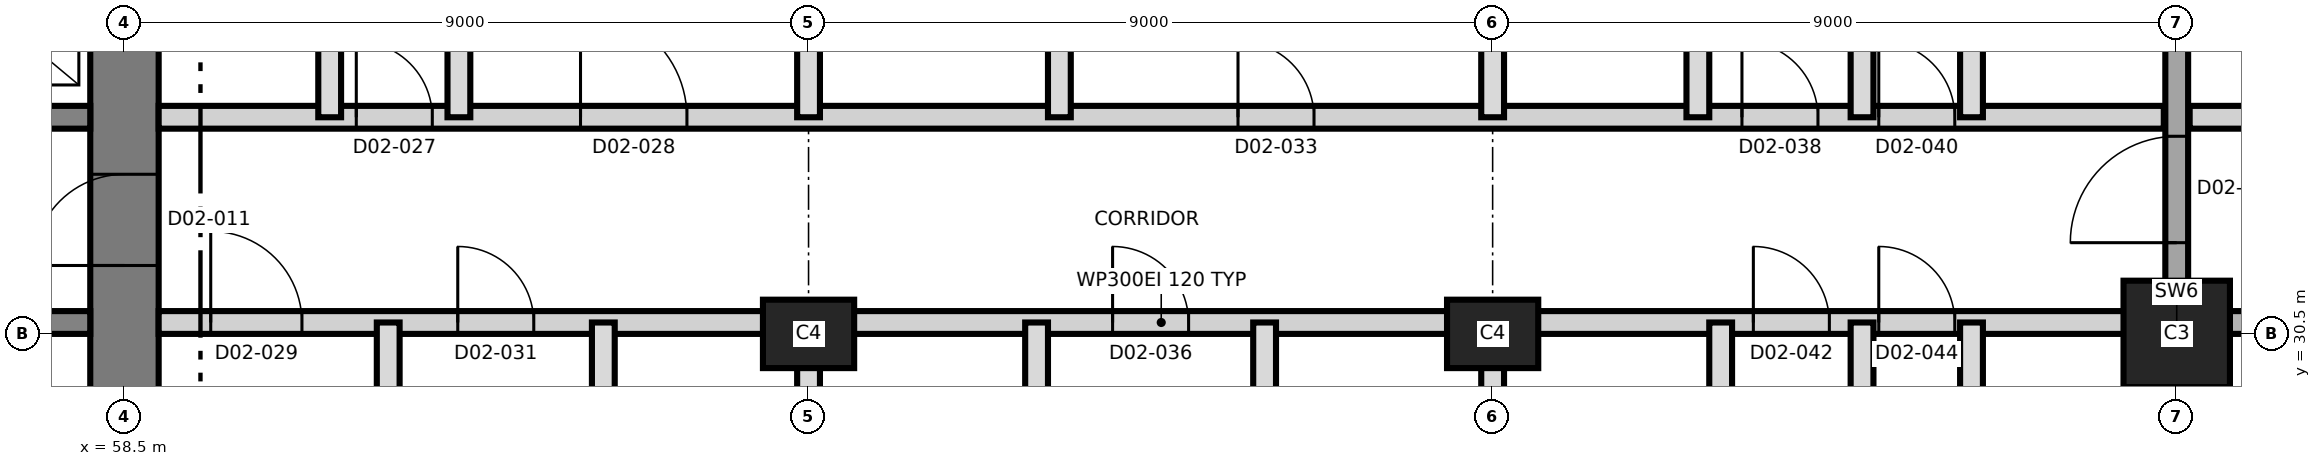
"""IFC4 building model, lengths in metres.
Left out: names, types, materials, properties, quantities, classifications, styles, units other than length and angle.
Written with IfcOpenShell. Run it as: python <this file> out.ifc"""

import sys

from ifc_helpers import new_model, si_unit, direction, frame, frame_2d, origin, origin_2d, place, context, subcontext, project, spatial, rectangle, extrude, element, fill, save


model = new_model("IFC4")
c1 = context("Model", 3, precision=1e-05, world=origin(), true_north=direction((0.0, 1.0)))
c2 = subcontext(c1, "Body", "Model", "MODEL_VIEW")
j1 = project(units=[si_unit("LENGTHUNIT", "METRE"), si_unit("PLANEANGLEUNIT", "RADIAN")], contexts=[c1])
p1 = place(None, origin())
s1 = spatial("IfcSite", under=j1, at=p1, CompositionType="ELEMENT")
p2 = place(p1, origin())
s2 = spatial("IfcBuilding", under=s1, at=p2, CompositionType="ELEMENT")
p3 = place(p2, frame((0.0, 0.0, 44.6)))
s3 = spatial("IfcBuildingStorey", under=s2, at=p3, CompositionType="ELEMENT", Elevation=44.6)
p4 = place(p3, frame((58.5, 21.05, 0.0), z_axis=(0.0, 0.0, 1.0), x_axis=(0.0, 1.0, 0.0)))
e1 = element("IfcWall", 1, at=p4, inside=s3, PredefinedType="SHEAR", context=c2, shape_type="SweptSolid", body=[
    extrude(rectangle(XDim=18.9, YDim=0.9, at=frame_2d((9.45, 0.0))), origin(), (0.0, 0.0, 1.0), 3.7),
])
p5 = place(p4, frame((10.35, 0.0, 0.0)))
e2 = element("IfcOpeningElement", 2, at=p5, cuts=e1, PredefinedType="OPENING", context=c2, shape_type="SweptSolid", body=[
    extrude(rectangle(XDim=1.2, YDim=2.1, at=frame_2d((0.6, 1.05))), frame((0.0, 0.46, 0.0), z_axis=(0.0, -1.0, 0.0), x_axis=(1.0, 0.0, 0.0)), (0.0, 0.0, 1.0), 0.92),
])
p6 = place(p3, frame((31.95, 30.65, 0.0), z_axis=(0.0, 0.0, 1.0), x_axis=(1.0, 0.0, 0.0)))
e3 = element("IfcWall", 3, at=p6, inside=s3, PredefinedType="SHEAR", context=c2, shape_type="SweptSolid", body=[
    extrude(rectangle(XDim=26.1, YDim=0.3, at=frame_2d((13.05, 0.0))), origin(), (0.0, 0.0, 1.0), 3.7),
])
p7 = place(p6, frame((24.55, 0.0, 0.0)))
e4 = element("IfcOpeningElement", 4, at=p7, cuts=e3, PredefinedType="OPENING", context=c2, shape_type="SweptSolid", body=[
    extrude(rectangle(XDim=1.0, YDim=2.1, at=frame_2d((0.5, 1.05))), frame((0.0, 0.16, 0.0), z_axis=(0.0, -1.0, 0.0), x_axis=(1.0, 0.0, 0.0)), (0.0, 0.0, 1.0), 0.32),
])
p8 = place(p6, frame((11.35, 0.0, 0.0)))
e5 = element("IfcOpeningElement", 5, at=p8, cuts=e3, PredefinedType="OPENING", context=c2, shape_type="SweptSolid", body=[
    extrude(rectangle(XDim=1.0, YDim=2.1, at=frame_2d((0.5, 1.05))), frame((0.0, 0.16, 0.0), z_axis=(0.0, -1.0, 0.0), x_axis=(1.0, 0.0, 0.0)), (0.0, 0.0, 1.0), 0.32),
])
p9 = place(p3, frame((31.95, 33.35, 0.0), z_axis=(0.0, 0.0, 1.0), x_axis=(1.0, 0.0, 0.0)))
e6 = element("IfcWall", 6, at=p9, inside=s3, PredefinedType="SHEAR", context=c2, shape_type="SweptSolid", body=[
    extrude(rectangle(XDim=26.1, YDim=0.3, at=frame_2d((13.05, 0.0))), origin(), (0.0, 0.0, 1.0), 3.7),
])
p10 = place(p9, frame((13.7, 0.0, 0.0)))
e7 = element("IfcOpeningElement", 7, at=p10, cuts=e6, PredefinedType="OPENING", context=c2, shape_type="SweptSolid", body=[
    extrude(rectangle(XDim=1.4, YDim=2.1, at=frame_2d((0.7, 1.05))), frame((0.0, 0.16, 0.0), z_axis=(0.0, -1.0, 0.0), x_axis=(1.0, 0.0, 0.0)), (0.0, 0.0, 1.0), 0.32),
])
p11 = place(p9, frame((5.175, 0.0, 0.0)))
e8 = element("IfcOpeningElement", 8, at=p11, cuts=e6, PredefinedType="OPENING", context=c2, shape_type="SweptSolid", body=[
    extrude(rectangle(XDim=1.2, YDim=2.1, at=frame_2d((0.6, 1.05))), frame((0.0, 0.16, 0.0), z_axis=(0.0, -1.0, 0.0), x_axis=(1.0, 0.0, 0.0)), (0.0, 0.0, 1.0), 0.32),
])
p12 = place(p9, frame((19.725, 0.0, 0.0)))
e9 = element("IfcOpeningElement", 9, at=p12, cuts=e6, PredefinedType="OPENING", context=c2, shape_type="SweptSolid", body=[
    extrude(rectangle(XDim=1.2, YDim=2.1, at=frame_2d((0.6, 1.05))), frame((0.0, 0.16, 0.0), z_axis=(0.0, -1.0, 0.0), x_axis=(1.0, 0.0, 0.0)), (0.0, 0.0, 1.0), 0.32),
])
for number, where, z_axis, x_axis in (
    (10, (67.5, 30.5, 0.0), (0.0, 0.0, 1.0), (1.0, 0.0, 0.0)),
    (11, (76.5, 30.5, 0.0), (0.0, 0.0, 1.0), (1.0, 0.0, 0.0)),
):
    element("IfcColumn", number, at=place(p3, frame(where, z_axis=z_axis, x_axis=x_axis)), inside=s3, PredefinedType="COLUMN", context=c2, shape_type="SweptSolid", body=[
        extrude(rectangle(XDim=1.2, YDim=0.9, at=origin_2d()), origin(), (0.0, 0.0, 1.0), 3.7),
    ])
p13 = place(p3, frame((85.5, 30.5, 0.0), z_axis=(0.0, 0.0, 1.0), x_axis=(1.0, 0.0, 0.0)))
e12 = element("IfcColumn", 12, at=p13, inside=s3, PredefinedType="COLUMN", context=c2, shape_type="SweptSolid", body=[
    extrude(rectangle(XDim=1.4, YDim=1.4, at=origin_2d()), origin(), (0.0, 0.0, 1.0), 3.7),
])
p14 = place(p3, frame((85.5, 20.565, 0.0), z_axis=(0.0, 0.0, 1.0), x_axis=(0.0, 1.0, 0.0)))
e13 = element("IfcWall", 13, at=p14, inside=s3, PredefinedType="SHEAR", context=c2, shape_type="SweptSolid", body=[
    extrude(rectangle(XDim=19.87, YDim=0.3, at=frame_2d((9.935, 0.0))), origin(), (0.0, 0.0, 1.0), 3.7),
])
p15 = place(p14, frame((11.135, 0.0, 0.0)))
e14 = element("IfcOpeningElement", 14, at=p15, cuts=e13, PredefinedType="OPENING", context=c2, shape_type="SweptSolid", body=[
    extrude(rectangle(XDim=1.4, YDim=2.1, at=frame_2d((0.7, 1.05))), frame((0.0, 0.16, 0.0), z_axis=(0.0, -1.0, 0.0), x_axis=(1.0, 0.0, 0.0)), (0.0, 0.0, 1.0), 0.32),
])
p16 = place(p3, frame((58.95, 30.65, 0.0), z_axis=(0.0, 0.0, 1.0), x_axis=(1.0, 0.0, 0.0)))
e15 = element("IfcWall", 15, at=p16, inside=s3, PredefinedType="PARTITIONING", context=c2, shape_type="SweptSolid", body=[
    extrude(rectangle(XDim=26.38, YDim=0.3, at=frame_2d((13.19, 0.0))), origin(), (0.0, 0.0, 1.0), 3.4),
])
p17 = place(p16, frame((0.685, 0.0, 0.0)))
e16 = element("IfcOpeningElement", 16, at=p17, cuts=e15, PredefinedType="OPENING", context=c2, shape_type="SweptSolid", body=[
    extrude(rectangle(XDim=1.2, YDim=2.1, at=frame_2d((0.6, 1.05))), frame((0.0, 0.16, 0.0), z_axis=(0.0, -1.0, 0.0), x_axis=(1.0, 0.0, 0.0)), (0.0, 0.0, 1.0), 0.32),
])
p18 = place(p16, frame((3.935, 0.0, 0.0)))
e17 = element("IfcOpeningElement", 17, at=p18, cuts=e15, PredefinedType="OPENING", context=c2, shape_type="SweptSolid", body=[
    extrude(rectangle(XDim=1.0, YDim=2.1, at=frame_2d((0.5, 1.05))), frame((0.0, 0.16, 0.0), z_axis=(0.0, -1.0, 0.0), x_axis=(1.0, 0.0, 0.0)), (0.0, 0.0, 1.0), 0.32),
])
p19 = place(p16, frame((12.55, 0.0, 0.0)))
e18 = element("IfcOpeningElement", 18, at=p19, cuts=e15, PredefinedType="OPENING", context=c2, shape_type="SweptSolid", body=[
    extrude(rectangle(XDim=1.0, YDim=2.4, at=frame_2d((0.5, 1.2))), frame((0.0, 0.16, 0.0), z_axis=(0.0, -1.0, 0.0), x_axis=(1.0, 0.0, 0.0)), (0.0, 0.0, 1.0), 0.32),
])
p20 = place(p16, frame((20.98, 0.0, 0.0)))
e19 = element("IfcOpeningElement", 19, at=p20, cuts=e15, PredefinedType="OPENING", context=c2, shape_type="SweptSolid", body=[
    extrude(rectangle(XDim=1.0, YDim=2.4, at=frame_2d((0.5, 1.2))), frame((0.0, 0.16, 0.0), z_axis=(0.0, -1.0, 0.0), x_axis=(1.0, 0.0, 0.0)), (0.0, 0.0, 1.0), 0.32),
])
p21 = place(p16, frame((22.63, 0.0, 0.0)))
e20 = element("IfcOpeningElement", 20, at=p21, cuts=e15, PredefinedType="OPENING", context=c2, shape_type="SweptSolid", body=[
    extrude(rectangle(XDim=1.0, YDim=2.4, at=frame_2d((0.5, 1.2))), frame((0.0, 0.16, 0.0), z_axis=(0.0, -1.0, 0.0), x_axis=(1.0, 0.0, 0.0)), (0.0, 0.0, 1.0), 0.32),
])
p22 = place(p3, frame((85.67, 30.65, 0.0), z_axis=(0.0, 0.0, 1.0), x_axis=(1.0, 0.0, 0.0)))
e21 = element("IfcWall", 21, at=p22, inside=s3, PredefinedType="SHEAR", context=c2, shape_type="SweptSolid", body=[
    extrude(rectangle(XDim=9.58, YDim=0.3, at=frame_2d((4.79, 0.0))), origin(), (0.0, 0.0, 1.0), 3.4),
])
p23 = place(p22, frame((2.08, 0.0, 0.0)))
e22 = element("IfcOpeningElement", 22, at=p23, cuts=e21, PredefinedType="OPENING", context=c2, shape_type="SweptSolid", body=[
    extrude(rectangle(XDim=1.2, YDim=2.1, at=frame_2d((0.6, 1.05))), frame((0.0, 0.16, 0.0), z_axis=(0.0, -1.0, 0.0), x_axis=(1.0, 0.0, 0.0)), (0.0, 0.0, 1.0), 0.32),
])
p24 = place(p22, frame((5.63, 0.0, 0.0)))
e23 = element("IfcOpeningElement", 23, at=p24, cuts=e21, PredefinedType="OPENING", context=c2, shape_type="SweptSolid", body=[
    extrude(rectangle(XDim=1.0, YDim=2.1, at=frame_2d((0.5, 1.05))), frame((0.0, 0.16, 0.0), z_axis=(0.0, -1.0, 0.0), x_axis=(1.0, 0.0, 0.0)), (0.0, 0.0, 1.0), 0.32),
])
p25 = place(p3, frame((58.95, 33.35, 0.0), z_axis=(0.0, 0.0, 1.0), x_axis=(1.0, 0.0, 0.0)))
e24 = element("IfcWall", 24, at=p25, inside=s3, PredefinedType="PARTITIONING", context=c2, shape_type="SweptSolid", body=[
    extrude(rectangle(XDim=26.38, YDim=0.3, at=frame_2d((13.19, 0.0))), origin(), (0.0, 0.0, 1.0), 3.4),
])
p26 = place(p25, frame((2.6, 0.0, 0.0)))
e25 = element("IfcOpeningElement", 25, at=p26, cuts=e24, PredefinedType="OPENING", context=c2, shape_type="SweptSolid", body=[
    extrude(rectangle(XDim=1.0, YDim=2.1, at=frame_2d((0.5, 1.05))), frame((0.0, 0.16, 0.0), z_axis=(0.0, -1.0, 0.0), x_axis=(1.0, 0.0, 0.0)), (0.0, 0.0, 1.0), 0.32),
])
p27 = place(p25, frame((5.55, 0.0, 0.0)))
e26 = element("IfcOpeningElement", 26, at=p27, cuts=e24, PredefinedType="OPENING", context=c2, shape_type="SweptSolid", body=[
    extrude(rectangle(XDim=1.4, YDim=2.1, at=frame_2d((0.7, 1.05))), frame((0.0, 0.16, 0.0), z_axis=(0.0, -1.0, 0.0), x_axis=(1.0, 0.0, 0.0)), (0.0, 0.0, 1.0), 0.32),
])
p28 = place(p25, frame((14.2, 0.0, 0.0)))
e27 = element("IfcOpeningElement", 27, at=p28, cuts=e24, PredefinedType="OPENING", context=c2, shape_type="SweptSolid", body=[
    extrude(rectangle(XDim=1.0, YDim=2.4, at=frame_2d((0.5, 1.2))), frame((0.0, 0.16, 0.0), z_axis=(0.0, -1.0, 0.0), x_axis=(1.0, 0.0, 0.0)), (0.0, 0.0, 1.0), 0.32),
])
p29 = place(p25, frame((20.83, 0.0, 0.0)))
e28 = element("IfcOpeningElement", 28, at=p29, cuts=e24, PredefinedType="OPENING", context=c2, shape_type="SweptSolid", body=[
    extrude(rectangle(XDim=1.0, YDim=2.1, at=frame_2d((0.5, 1.05))), frame((0.0, 0.16, 0.0), z_axis=(0.0, -1.0, 0.0), x_axis=(1.0, 0.0, 0.0)), (0.0, 0.0, 1.0), 0.32),
])
p30 = place(p25, frame((22.63, 0.0, 0.0)))
e29 = element("IfcOpeningElement", 29, at=p30, cuts=e24, PredefinedType="OPENING", context=c2, shape_type="SweptSolid", body=[
    extrude(rectangle(XDim=1.0, YDim=2.1, at=frame_2d((0.5, 1.05))), frame((0.0, 0.16, 0.0), z_axis=(0.0, -1.0, 0.0), x_axis=(1.0, 0.0, 0.0)), (0.0, 0.0, 1.0), 0.32),
])
p31 = place(p3, frame((85.67, 33.35, 0.0), z_axis=(0.0, 0.0, 1.0), x_axis=(1.0, 0.0, 0.0)))
e30 = element("IfcWall", 30, at=p31, inside=s3, PredefinedType="PARTITIONING", context=c2, shape_type="SweptSolid", body=[
    extrude(rectangle(XDim=9.58, YDim=0.3, at=frame_2d((4.79, 0.0))), origin(), (0.0, 0.0, 1.0), 3.4),
])
p32 = place(p31, frame((1.83, 0.0, 0.0)))
e31 = element("IfcOpeningElement", 31, at=p32, cuts=e30, PredefinedType="OPENING", context=c2, shape_type="SweptSolid", body=[
    extrude(rectangle(XDim=1.0, YDim=2.1, at=frame_2d((0.5, 1.05))), frame((0.0, 0.16, 0.0), z_axis=(0.0, -1.0, 0.0), x_axis=(1.0, 0.0, 0.0)), (0.0, 0.0, 1.0), 0.32),
])
p33 = place(p31, frame((5.63, 0.0, 0.0)))
e32 = element("IfcOpeningElement", 32, at=p33, cuts=e30, PredefinedType="OPENING", context=c2, shape_type="SweptSolid", body=[
    extrude(rectangle(XDim=1.0, YDim=2.1, at=frame_2d((0.5, 1.05))), frame((0.0, 0.16, 0.0), z_axis=(0.0, -1.0, 0.0), x_axis=(1.0, 0.0, 0.0)), (0.0, 0.0, 1.0), 0.32),
])
p34 = place(p3, frame((61.2, 33.35, 0.0), z_axis=(0.0, 0.0, 1.0), x_axis=(0.0, 1.0, 0.0)))
e33 = element("IfcWall", 33, at=p34, inside=s3, PredefinedType="PARTITIONING", context=c2, shape_type="SweptSolid", body=[
    extrude(rectangle(XDim=3.2, YDim=0.3, at=frame_2d((1.6, 0.0))), origin(), (0.0, 0.0, 1.0), 3.4),
])
p35 = place(p3, frame((61.97, 20.565, 0.0), z_axis=(0.0, 0.0, 1.0), x_axis=(0.0, 1.0, 0.0)))
e34 = element("IfcWall", 34, at=p35, inside=s3, PredefinedType="PARTITIONING", context=c2, shape_type="SweptSolid", body=[
    extrude(rectangle(XDim=10.085, YDim=0.3, at=frame_2d((5.042, 0.0))), origin(), (0.0, 0.0, 1.0), 3.4),
])
p36 = place(p3, frame((62.9, 33.35, 0.0), z_axis=(0.0, 0.0, 1.0), x_axis=(0.0, 1.0, 0.0)))
e35 = element("IfcWall", 35, at=p36, inside=s3, PredefinedType="PARTITIONING", context=c2, shape_type="SweptSolid", body=[
    extrude(rectangle(XDim=7.265, YDim=0.3, at=frame_2d((3.632, 0.0))), origin(), (0.0, 0.0, 1.0), 3.4),
])
p37 = place(p3, frame((64.8, 27.45, 0.0), z_axis=(0.0, 0.0, 1.0), x_axis=(0.0, 1.0, 0.0)))
e36 = element("IfcWall", 36, at=p37, inside=s3, PredefinedType="PARTITIONING", context=c2, shape_type="SweptSolid", body=[
    extrude(rectangle(XDim=3.2, YDim=0.3, at=frame_2d((1.6, 0.0))), origin(), (0.0, 0.0, 1.0), 3.4),
])
p38 = place(p3, frame((67.5, 20.565, 0.0), z_axis=(0.0, 0.0, 1.0), x_axis=(0.0, 1.0, 0.0)))
e37 = element("IfcWall", 37, at=p38, inside=s3, PredefinedType="PARTITIONING", context=c2, shape_type="SweptSolid", body=[
    extrude(rectangle(XDim=10.085, YDim=0.3, at=frame_2d((5.042, 0.0))), origin(), (0.0, 0.0, 1.0), 3.4),
])
p39 = place(p3, frame((67.5, 33.35, 0.0), z_axis=(0.0, 0.0, 1.0), x_axis=(0.0, 1.0, 0.0)))
e38 = element("IfcWall", 38, at=p39, inside=s3, PredefinedType="PARTITIONING", context=c2, shape_type="SweptSolid", body=[
    extrude(rectangle(XDim=7.265, YDim=0.3, at=frame_2d((3.632, 0.0))), origin(), (0.0, 0.0, 1.0), 3.4),
])
p40 = place(p3, frame((70.5, 27.35, 0.0), z_axis=(0.0, 0.0, 1.0), x_axis=(0.0, 1.0, 0.0)))
e39 = element("IfcWall", 39, at=p40, inside=s3, PredefinedType="PARTITIONING", context=c2, shape_type="SweptSolid", body=[
    extrude(rectangle(XDim=3.3, YDim=0.3, at=frame_2d((1.65, 0.0))), origin(), (0.0, 0.0, 1.0), 3.4),
])
p41 = place(p3, frame((70.8, 33.35, 0.0), z_axis=(0.0, 0.0, 1.0), x_axis=(0.0, 1.0, 0.0)))
e40 = element("IfcWall", 40, at=p41, inside=s3, PredefinedType="PARTITIONING", context=c2, shape_type="SweptSolid", body=[
    extrude(rectangle(XDim=3.5, YDim=0.3, at=frame_2d((1.75, 0.0))), origin(), (0.0, 0.0, 1.0), 3.4),
])
p42 = place(p3, frame((73.5, 27.35, 0.0), z_axis=(0.0, 0.0, 1.0), x_axis=(0.0, 1.0, 0.0)))
e41 = element("IfcWall", 41, at=p42, inside=s3, PredefinedType="PARTITIONING", context=c2, shape_type="SweptSolid", body=[
    extrude(rectangle(XDim=3.3, YDim=0.3, at=frame_2d((1.65, 0.0))), origin(), (0.0, 0.0, 1.0), 3.4),
])
p43 = place(p3, frame((76.5, 20.565, 0.0), z_axis=(0.0, 0.0, 1.0), x_axis=(0.0, 1.0, 0.0)))
e42 = element("IfcWall", 42, at=p43, inside=s3, PredefinedType="PARTITIONING", context=c2, shape_type="SweptSolid", body=[
    extrude(rectangle(XDim=10.085, YDim=0.3, at=frame_2d((5.042, 0.0))), origin(), (0.0, 0.0, 1.0), 3.4),
])
p44 = place(p3, frame((76.5, 33.35, 0.0), z_axis=(0.0, 0.0, 1.0), x_axis=(0.0, 1.0, 0.0)))
e43 = element("IfcWall", 43, at=p44, inside=s3, PredefinedType="PARTITIONING", context=c2, shape_type="SweptSolid", body=[
    extrude(rectangle(XDim=7.265, YDim=0.3, at=frame_2d((3.632, 0.0))), origin(), (0.0, 0.0, 1.0), 3.4),
])
p45 = place(p3, frame((79.2, 33.35, 0.0), z_axis=(0.0, 0.0, 1.0), x_axis=(0.0, 1.0, 0.0)))
e44 = element("IfcWall", 44, at=p45, inside=s3, PredefinedType="PARTITIONING", context=c2, shape_type="SweptSolid", body=[
    extrude(rectangle(XDim=3.2, YDim=0.3, at=frame_2d((1.6, 0.0))), origin(), (0.0, 0.0, 1.0), 3.4),
])
p46 = place(p3, frame((79.5, 27.35, 0.0), z_axis=(0.0, 0.0, 1.0), x_axis=(0.0, 1.0, 0.0)))
e45 = element("IfcWall", 45, at=p46, inside=s3, PredefinedType="PARTITIONING", context=c2, shape_type="SweptSolid", body=[
    extrude(rectangle(XDim=3.3, YDim=0.3, at=frame_2d((1.65, 0.0))), origin(), (0.0, 0.0, 1.0), 3.4),
])
p47 = place(p3, frame((81.36, 20.565, 0.0), z_axis=(0.0, 0.0, 1.0), x_axis=(0.0, 1.0, 0.0)))
e46 = element("IfcWall", 46, at=p47, inside=s3, PredefinedType="PARTITIONING", context=c2, shape_type="SweptSolid", body=[
    extrude(rectangle(XDim=10.085, YDim=0.3, at=frame_2d((5.042, 0.0))), origin(), (0.0, 0.0, 1.0), 3.4),
])
p48 = place(p3, frame((81.36, 33.35, 0.0), z_axis=(0.0, 0.0, 1.0), x_axis=(0.0, 1.0, 0.0)))
e47 = element("IfcWall", 47, at=p48, inside=s3, PredefinedType="PARTITIONING", context=c2, shape_type="SweptSolid", body=[
    extrude(rectangle(XDim=7.265, YDim=0.3, at=frame_2d((3.632, 0.0))), origin(), (0.0, 0.0, 1.0), 3.4),
])
p49 = place(p3, frame((82.8, 27.35, 0.0), z_axis=(0.0, 0.0, 1.0), x_axis=(0.0, 1.0, 0.0)))
e48 = element("IfcWall", 48, at=p49, inside=s3, PredefinedType="PARTITIONING", context=c2, shape_type="SweptSolid", body=[
    extrude(rectangle(XDim=3.3, YDim=0.3, at=frame_2d((1.65, 0.0))), origin(), (0.0, 0.0, 1.0), 3.4),
])
p50 = place(p3, frame((82.8, 33.35, 0.0), z_axis=(0.0, 0.0, 1.0), x_axis=(0.0, 1.0, 0.0)))
e49 = element("IfcWall", 49, at=p50, inside=s3, PredefinedType="PARTITIONING", context=c2, shape_type="SweptSolid", body=[
    extrude(rectangle(XDim=3.2, YDim=0.3, at=frame_2d((1.6, 0.0))), origin(), (0.0, 0.0, 1.0), 3.4),
])
p51 = place(p5, origin())
e50 = element("IfcDoor", 50, at=p51, inside=s3, OperationType="SINGLE_SWING_LEFT", PredefinedType="DOOR", context=c2, shape_type="SweptSolid", body=[
    extrude(rectangle(XDim=1.2, YDim=2.1, at=frame_2d((0.6, 1.05))), frame((0.0, 0.025, 0.0), z_axis=(0.0, -1.0, 0.0), x_axis=(1.0, 0.0, 0.0)), (0.0, 0.0, 1.0), 0.05),
])
fill(e2, e50)
p52 = place(p26, origin())
e51 = element("IfcDoor", 51, at=p52, inside=s3, OperationType="SINGLE_SWING_LEFT", PredefinedType="DOOR", context=c2, shape_type="SweptSolid", body=[
    extrude(rectangle(XDim=1.0, YDim=2.1, at=frame_2d((0.5, 1.05))), frame((0.0, 0.025, 0.0), z_axis=(0.0, -1.0, 0.0), x_axis=(1.0, 0.0, 0.0)), (0.0, 0.0, 1.0), 0.05),
])
fill(e25, e51)
p53 = place(p27, origin())
e52 = element("IfcDoor", 52, at=p53, inside=s3, OperationType="SINGLE_SWING_RIGHT", PredefinedType="DOOR", context=c2, shape_type="SweptSolid", body=[
    extrude(rectangle(XDim=1.4, YDim=2.1, at=frame_2d((0.7, 1.05))), frame((0.0, 0.025, 0.0), z_axis=(0.0, -1.0, 0.0), x_axis=(1.0, 0.0, 0.0)), (0.0, 0.0, 1.0), 0.05),
])
fill(e26, e52)
p54 = place(p17, origin())
e53 = element("IfcDoor", 53, at=p54, inside=s3, OperationType="SINGLE_SWING_LEFT", PredefinedType="DOOR", context=c2, shape_type="SweptSolid", body=[
    extrude(rectangle(XDim=1.2, YDim=2.1, at=frame_2d((0.6, 1.05))), frame((0.0, 0.025, 0.0), z_axis=(0.0, -1.0, 0.0), x_axis=(1.0, 0.0, 0.0)), (0.0, 0.0, 1.0), 0.05),
])
fill(e16, e53)
p55 = place(p18, origin())
e54 = element("IfcDoor", 54, at=p55, inside=s3, OperationType="SINGLE_SWING_LEFT", PredefinedType="DOOR", context=c2, shape_type="SweptSolid", body=[
    extrude(rectangle(XDim=1.0, YDim=2.1, at=frame_2d((0.5, 1.05))), frame((0.0, 0.025, 0.0), z_axis=(0.0, -1.0, 0.0), x_axis=(1.0, 0.0, 0.0)), (0.0, 0.0, 1.0), 0.05),
])
fill(e17, e54)
p56 = place(p28, origin())
e55 = element("IfcDoor", 55, at=p56, inside=s3, OperationType="SINGLE_SWING_LEFT", PredefinedType="DOOR", context=c2, shape_type="SweptSolid", body=[
    extrude(rectangle(XDim=1.0, YDim=2.4, at=frame_2d((0.5, 1.2))), frame((0.0, 0.025, 0.0), z_axis=(0.0, -1.0, 0.0), x_axis=(1.0, 0.0, 0.0)), (0.0, 0.0, 1.0), 0.05),
])
fill(e27, e55)
p57 = place(p19, origin())
e56 = element("IfcDoor", 56, at=p57, inside=s3, OperationType="SINGLE_SWING_RIGHT", PredefinedType="DOOR", context=c2, shape_type="SweptSolid", body=[
    extrude(rectangle(XDim=1.0, YDim=2.4, at=frame_2d((0.5, 1.2))), frame((0.0, 0.025, 0.0), z_axis=(0.0, -1.0, 0.0), x_axis=(1.0, 0.0, 0.0)), (0.0, 0.0, 1.0), 0.05),
])
fill(e18, e56)
p58 = place(p29, origin())
e57 = element("IfcDoor", 57, at=p58, inside=s3, OperationType="SINGLE_SWING_RIGHT", PredefinedType="DOOR", context=c2, shape_type="SweptSolid", body=[
    extrude(rectangle(XDim=1.0, YDim=2.1, at=frame_2d((0.5, 1.05))), frame((0.0, 0.025, 0.0), z_axis=(0.0, -1.0, 0.0), x_axis=(1.0, 0.0, 0.0)), (0.0, 0.0, 1.0), 0.05),
])
fill(e28, e57)
p59 = place(p30, origin())
e58 = element("IfcDoor", 58, at=p59, inside=s3, OperationType="SINGLE_SWING_LEFT", PredefinedType="DOOR", context=c2, shape_type="SweptSolid", body=[
    extrude(rectangle(XDim=1.0, YDim=2.1, at=frame_2d((0.5, 1.05))), frame((0.0, 0.025, 0.0), z_axis=(0.0, -1.0, 0.0), x_axis=(1.0, 0.0, 0.0)), (0.0, 0.0, 1.0), 0.05),
])
fill(e29, e58)
p60 = place(p20, origin())
e59 = element("IfcDoor", 59, at=p60, inside=s3, OperationType="SINGLE_SWING_LEFT", PredefinedType="DOOR", context=c2, shape_type="SweptSolid", body=[
    extrude(rectangle(XDim=1.0, YDim=2.4, at=frame_2d((0.5, 1.2))), frame((0.0, 0.025, 0.0), z_axis=(0.0, -1.0, 0.0), x_axis=(1.0, 0.0, 0.0)), (0.0, 0.0, 1.0), 0.05),
])
fill(e19, e59)
p61 = place(p21, origin())
e60 = element("IfcDoor", 60, at=p61, inside=s3, OperationType="SINGLE_SWING_RIGHT", PredefinedType="DOOR", context=c2, shape_type="SweptSolid", body=[
    extrude(rectangle(XDim=1.0, YDim=2.4, at=frame_2d((0.5, 1.2))), frame((0.0, 0.025, 0.0), z_axis=(0.0, -1.0, 0.0), x_axis=(1.0, 0.0, 0.0)), (0.0, 0.0, 1.0), 0.05),
])
fill(e20, e60)
p62 = place(p15, origin())
e61 = element("IfcDoor", 61, at=p62, inside=s3, OperationType="SINGLE_SWING_RIGHT", PredefinedType="DOOR", context=c2, shape_type="SweptSolid", body=[
    extrude(rectangle(XDim=1.4, YDim=2.1, at=frame_2d((0.7, 1.05))), frame((0.0, 0.025, 0.0), z_axis=(0.0, -1.0, 0.0), x_axis=(1.0, 0.0, 0.0)), (0.0, 0.0, 1.0), 0.05),
])
fill(e14, e61)
save(model, sys.argv[1])
